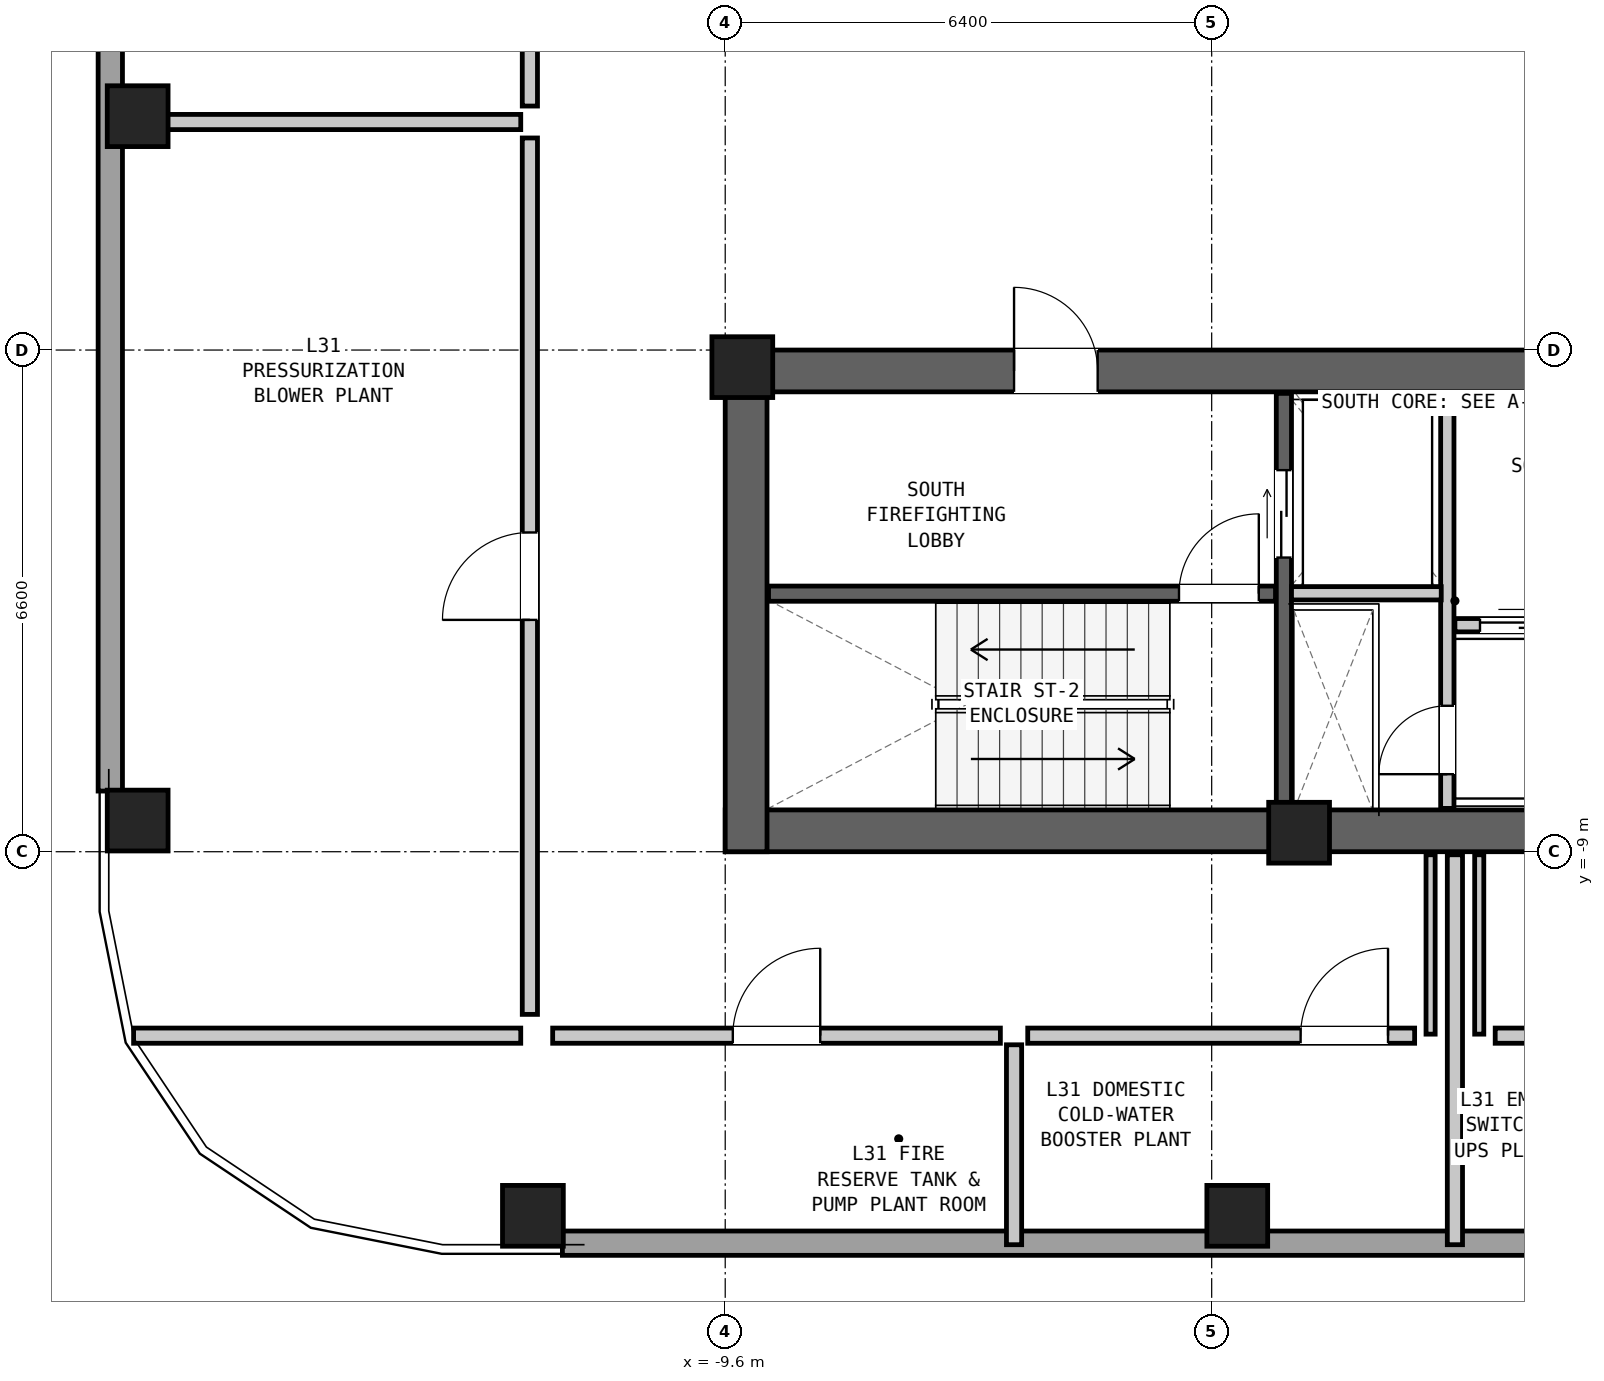
"""IFC4 building model, lengths in metres.
Left out: names, types, materials, properties, quantities, classifications, styles, units other than length and angle.
Written with IfcOpenShell. Run it as: python <this file> out.ifc"""

import sys

from ifc_helpers import new_model, si_unit, direction, frame, frame_2d, origin, origin_2d, place, context, subcontext, project, spatial, rectangle, hollow_rectangle, extrude, element, fill, save


model = new_model("IFC4")
c1 = context("Model", 3, precision=1e-05, world=origin(), true_north=direction((0.0, 1.0)))
c2 = subcontext(c1, "Body", "Model", "MODEL_VIEW")
j1 = project(units=[si_unit("LENGTHUNIT", "METRE"), si_unit("PLANEANGLEUNIT", "RADIAN")], contexts=[c1])
p1 = place(None, origin())
s1 = spatial("IfcSite", under=j1, at=p1, CompositionType="ELEMENT")
p2 = place(p1, origin())
s2 = spatial("IfcBuilding", under=s1, at=p2, CompositionType="ELEMENT")
p3 = place(p2, frame((0.0, 0.0, 108.45)))
s3 = spatial("IfcBuildingStorey", under=s2, at=p3, CompositionType="ELEMENT", Elevation=108.45)
p4 = place(p3, frame((-9.6, -8.725, 0.0), z_axis=(0.0, 0.0, 1.0), x_axis=(1.0, 0.0, 0.0)))
e1 = element("IfcWall", 1, at=p4, inside=s3, PredefinedType="SHEAR", context=c2, shape_type="SweptSolid", body=[
    extrude(rectangle(XDim=19.2, YDim=0.55, at=frame_2d((9.6, 0.0))), origin(), (0.0, 0.0, 1.0), 4.35),
])
p5 = place(p3, frame((-9.6, -2.675, 0.0), z_axis=(0.0, 0.0, 1.0), x_axis=(1.0, 0.0, 0.0)))
e2 = element("IfcWall", 2, at=p5, inside=s3, PredefinedType="SHEAR", context=c2, shape_type="SweptSolid", body=[
    extrude(rectangle(XDim=19.2, YDim=0.55, at=frame_2d((9.6, 0.0))), origin(), (0.0, 0.0, 1.0), 4.35),
])
p6 = place(p5, frame((3.8, 0.0, 0.0)))
e3 = element("IfcOpeningElement", 3, at=p6, cuts=e2, PredefinedType="OPENING", context=c2, shape_type="SweptSolid", body=[
    extrude(rectangle(XDim=1.1, YDim=2.08, at=frame_2d((0.55, 1.04))), frame((0.0, 0.287, 0.0), z_axis=(0.0, -1.0, 0.0), x_axis=(1.0, 0.0, 0.0)), (0.0, 0.0, 1.0), 0.574),
])
p7 = place(p5, frame((13.0, 0.0, 0.0)))
e4 = element("IfcOpeningElement", 4, at=p7, cuts=e2, PredefinedType="OPENING", context=c2, shape_type="SweptSolid", body=[
    extrude(rectangle(XDim=1.6, YDim=2.12, at=frame_2d((0.8, 1.06))), frame((0.0, 0.287, 0.0), z_axis=(0.0, -1.0, 0.0), x_axis=(1.0, 0.0, 0.0)), (0.0, 0.0, 1.0), 0.574),
])
p8 = place(p3, frame((-9.325, -9.0, 0.0), z_axis=(0.0, 0.0, 1.0), x_axis=(0.0, 1.0, 0.0)))
e5 = element("IfcWall", 5, at=p8, inside=s3, PredefinedType="SHEAR", context=c2, shape_type="SweptSolid", body=[
    extrude(rectangle(XDim=6.6, YDim=0.55, at=frame_2d((3.3, 0.0))), origin(), (0.0, 0.0, 1.0), 4.35),
])
for number, where, z_axis, x_axis in (
    (6, (-12.13, -13.79, 0.0), (0.0, 0.0, 1.0), (1.0, 0.0, 0.0)),
    (7, (-2.863, -13.79, 0.0), (0.0, 0.0, 1.0), (1.0, 0.0, 0.0)),
    (8, (-17.33, 0.677, 0.0), (0.0, 0.0, 1.0), (0.0, 1.0, 0.0)),
    (9, (-17.33, -8.59, 0.0), (0.0, 0.0, 1.0), (0.0, 1.0, 0.0)),
):
    element("IfcColumn", number, at=place(p3, frame(where, z_axis=z_axis, x_axis=x_axis)), inside=s3, PredefinedType="COLUMN", context=c2, shape_type="SweptSolid", body=[
        extrude(hollow_rectangle(XDim=0.8, YDim=0.8, WallThickness=0.05, at=origin_2d()), origin(), (0.0, 0.0, 1.0), 4.35),
    ])
for number, where, z_axis, x_axis in (
    (10, (-9.375, -2.625, 0.0), (0.0, 0.0, 1.0), (1.0, 0.0, 0.0)),
    (11, (-2.05, -8.75, 0.0), (0.0, 0.0, 1.0), (1.0, 0.0, 0.0)),
):
    element("IfcColumn", number, at=place(p3, frame(where, z_axis=z_axis, x_axis=x_axis)), inside=s3, PredefinedType="COLUMN", context=c2, shape_type="SweptSolid", body=[
        extrude(rectangle(XDim=0.8, YDim=0.8, at=origin_2d()), origin(), (0.0, 0.0, 1.0), 4.35),
    ])
for number, where, z_axis, x_axis in (
    (12, (15.282, -14.15, 0.0), (0.0, 0.0, 1.0), (-1.0, 0.0, 0.0)),
    (13, (-17.69, -8.202, 0.0), (0.0, 0.0, 1.0), (0.0, 1.0, 0.0)),
):
    element("IfcWall", number, at=place(p3, frame(where, z_axis=z_axis, x_axis=x_axis)), inside=s3, PredefinedType="SOLIDWALL", context=c2, shape_type="SweptSolid", body=[
        extrude(rectangle(XDim=27.024, YDim=0.32, at=frame_2d((13.512, 0.0))), origin(), (0.0, 0.0, 1.0), 2.31),
    ])
p9 = place(p3, frame((-9.03, -5.605, 0.0), z_axis=(0.0, 0.0, 1.0), x_axis=(1.0, 0.0, 0.0)))
e14 = element("IfcWall", 14, at=p9, inside=s3, PredefinedType="SHEAR", context=c2, shape_type="SweptSolid", body=[
    extrude(rectangle(XDim=6.67, YDim=0.2, at=frame_2d((3.335, 0.0))), origin(), (0.0, 0.0, 1.0), 4.13),
])
p10 = place(p9, frame((5.4, 0.0, 0.0)))
e15 = element("IfcOpeningElement", 15, at=p10, cuts=e14, PredefinedType="OPENING", context=c2, shape_type="SweptSolid", body=[
    extrude(rectangle(XDim=1.05, YDim=2.08, at=frame_2d((0.525, 1.04))), frame((0.0, 0.112, 0.0), z_axis=(0.0, -1.0, 0.0), x_axis=(1.0, 0.0, 0.0)), (0.0, 0.0, 1.0), 0.224),
])
p11 = place(p3, frame((-2.25, -8.43, 0.0), z_axis=(0.0, 0.0, 1.0), x_axis=(0.0, 1.0, 0.0)))
e16 = element("IfcWall", 16, at=p11, inside=s3, PredefinedType="SHEAR", context=c2, shape_type="SweptSolid", body=[
    extrude(rectangle(XDim=5.46, YDim=0.2, at=frame_2d((2.73, 0.0))), origin(), (0.0, 0.0, 1.0), 4.13),
])
p12 = place(p11, frame((3.3, 0.0, 0.0)))
e17 = element("IfcOpeningElement", 17, at=p12, cuts=e16, PredefinedType="OPENING", context=c2, shape_type="SweptSolid", body=[
    extrude(rectangle(XDim=1.15, YDim=2.08, at=frame_2d((0.575, 1.04))), frame((0.0, 0.112, 0.0), z_axis=(0.0, -1.0, 0.0), x_axis=(1.0, 0.0, 0.0)), (0.0, 0.0, 1.0), 0.224),
])
p13 = place(p3, frame((-0.1, -8.43, 0.0), z_axis=(0.0, 0.0, 1.0), x_axis=(0.0, 1.0, 0.0)))
e18 = element("IfcWall", 18, at=p13, inside=s3, PredefinedType="PARTITIONING", context=c2, shape_type="SweptSolid", body=[
    extrude(rectangle(XDim=5.46, YDim=0.175, at=frame_2d((2.73, 0.0))), origin(), (0.0, 0.0, 1.0), 4.13),
])
p14 = place(p13, frame((0.45, 0.0, 0.0)))
e19 = element("IfcOpeningElement", 19, at=p14, cuts=e18, PredefinedType="OPENING", context=c2, shape_type="SweptSolid", body=[
    extrude(rectangle(XDim=0.9, YDim=2.05, at=frame_2d((0.45, 1.025))), frame((0.0, 0.1, 0.0), z_axis=(0.0, -1.0, 0.0), x_axis=(1.0, 0.0, 0.0)), (0.0, 0.0, 1.0), 0.199),
])
p15 = place(p3, frame((-2.15, -5.6, 0.0), z_axis=(0.0, 0.0, 1.0), x_axis=(1.0, 0.0, 0.0)))
e20 = element("IfcWall", 20, at=p15, inside=s3, PredefinedType="PARTITIONING", context=c2, shape_type="SweptSolid", body=[
    extrude(rectangle(XDim=1.97, YDim=0.175, at=frame_2d((0.985, 0.0))), origin(), (0.0, 0.0, 1.0), 4.13),
])
p16 = place(p3, frame((0.0, -6.02, 0.0), z_axis=(0.0, 0.0, 1.0), x_axis=(1.0, 0.0, 0.0)))
e21 = element("IfcWall", 21, at=p16, inside=s3, PredefinedType="PARTITIONING", context=c2, shape_type="SweptSolid", body=[
    extrude(rectangle(XDim=9.03, YDim=0.175, at=frame_2d((4.515, 0.0))), origin(), (0.0, 0.0, 1.0), 4.13),
])
p17 = place(p16, frame((0.33, 0.0, 0.0)))
e22 = element("IfcOpeningElement", 22, at=p17, cuts=e21, PredefinedType="OPENING", context=c2, shape_type="SweptSolid", body=[
    extrude(rectangle(XDim=1.1, YDim=2.06, at=frame_2d((0.55, 1.03))), frame((0.0, 0.1, 0.0), z_axis=(0.0, -1.0, 0.0), x_axis=(1.0, 0.0, 0.0)), (0.0, 0.0, 1.0), 0.199),
])
p18 = place(p16, frame((2.3, 0.0, 0.0)))
e23 = element("IfcOpeningElement", 23, at=p18, cuts=e21, PredefinedType="OPENING", context=c2, shape_type="SweptSolid", body=[
    extrude(rectangle(XDim=1.1, YDim=2.06, at=frame_2d((0.55, 1.03))), frame((0.0, 0.1, 0.0), z_axis=(0.0, -1.0, 0.0), x_axis=(1.0, 0.0, 0.0)), (0.0, 0.0, 1.0), 0.199),
])
p19 = place(p16, frame((4.22, 0.0, 0.0)))
e24 = element("IfcOpeningElement", 24, at=p19, cuts=e21, PredefinedType="OPENING", context=c2, shape_type="SweptSolid", body=[
    extrude(rectangle(XDim=1.1, YDim=2.06, at=frame_2d((0.55, 1.03))), frame((0.0, 0.1, 0.0), z_axis=(0.0, -1.0, 0.0), x_axis=(1.0, 0.0, 0.0)), (0.0, 0.0, 1.0), 0.199),
])
p20 = place(p16, frame((5.94, 0.0, 0.0)))
e25 = element("IfcOpeningElement", 25, at=p20, cuts=e21, PredefinedType="OPENING", context=c2, shape_type="SweptSolid", body=[
    extrude(rectangle(XDim=1.1, YDim=2.06, at=frame_2d((0.55, 1.03))), frame((0.0, 0.1, 0.0), z_axis=(0.0, -1.0, 0.0), x_axis=(1.0, 0.0, 0.0)), (0.0, 0.0, 1.0), 0.199),
])
p21 = place(p16, frame((7.66, 0.0, 0.0)))
e26 = element("IfcOpeningElement", 26, at=p21, cuts=e21, PredefinedType="OPENING", context=c2, shape_type="SweptSolid", body=[
    extrude(rectangle(XDim=1.1, YDim=2.06, at=frame_2d((0.55, 1.03))), frame((0.0, 0.1, 0.0), z_axis=(0.0, -1.0, 0.0), x_axis=(1.0, 0.0, 0.0)), (0.0, 0.0, 1.0), 0.199),
])
p22 = place(p3, frame((0.0, -14.17, 0.0), z_axis=(0.0, 0.0, 1.0), x_axis=(0.0, 1.0, 0.0)))
e27 = element("IfcWall", 27, at=p22, inside=s3, PredefinedType="PARTITIONING", context=c2, shape_type="SweptSolid", body=[
    extrude(rectangle(XDim=5.13, YDim=0.2, at=frame_2d((2.565, 0.0))), origin(), (0.0, 0.0, 1.0), 2.31),
])
for number, where, z_axis, x_axis in (
    (28, (-0.32, -11.4, 0.0), (0.0, 0.0, 1.0), (0.0, 1.0, 0.0)),
    (29, (0.32, -11.4, 0.0), (0.0, 0.0, 1.0), (0.0, 1.0, 0.0)),
):
    element("IfcWall", number, at=place(p3, frame(where, z_axis=z_axis, x_axis=x_axis)), inside=s3, PredefinedType="PARTITIONING", context=c2, shape_type="SweptSolid", body=[
        extrude(rectangle(XDim=2.36, YDim=0.12, at=frame_2d((1.18, 0.0))), origin(), (0.0, 0.0, 1.0), 2.31),
    ])
p23 = place(p3, frame((-11.87, -11.42, 0.0), z_axis=(0.0, 0.0, 1.0), x_axis=(1.0, 0.0, 0.0)))
e30 = element("IfcWall", 30, at=p23, inside=s3, PredefinedType="PARTITIONING", context=c2, shape_type="SweptSolid", body=[
    extrude(rectangle(XDim=5.89, YDim=0.2, at=frame_2d((2.945, 0.0))), origin(), (0.0, 0.0, 1.0), 3.647),
])
p24 = place(p23, frame((2.37, 0.0, 0.0)))
e31 = element("IfcOpeningElement", 31, at=p24, cuts=e30, PredefinedType="OPENING", context=c2, shape_type="SweptSolid", body=[
    extrude(rectangle(XDim=1.15, YDim=2.1, at=frame_2d((0.575, 1.05))), frame((0.0, 0.112, 0.0), z_axis=(0.0, -1.0, 0.0), x_axis=(1.0, 0.0, 0.0)), (0.0, 0.0, 1.0), 0.224),
])
p25 = place(p3, frame((-5.8, -14.17, 0.0), z_axis=(0.0, 0.0, 1.0), x_axis=(0.0, 1.0, 0.0)))
e32 = element("IfcWall", 32, at=p25, inside=s3, PredefinedType="PARTITIONING", context=c2, shape_type="SweptSolid", body=[
    extrude(rectangle(XDim=2.63, YDim=0.2, at=frame_2d((1.315, 0.0))), origin(), (0.0, 0.0, 1.0), 3.647),
])
p26 = place(p3, frame((-5.62, -11.42, 0.0), z_axis=(0.0, 0.0, 1.0), x_axis=(1.0, 0.0, 0.0)))
e33 = element("IfcWall", 33, at=p26, inside=s3, PredefinedType="PARTITIONING", context=c2, shape_type="SweptSolid", body=[
    extrude(rectangle(XDim=5.09, YDim=0.2, at=frame_2d((2.545, 0.0))), origin(), (0.0, 0.0, 1.0), 4.13),
])
p27 = place(p26, frame((3.59, 0.0, 0.0)))
e34 = element("IfcOpeningElement", 34, at=p27, cuts=e33, PredefinedType="OPENING", context=c2, shape_type="SweptSolid", body=[
    extrude(rectangle(XDim=1.15, YDim=2.1, at=frame_2d((0.575, 1.05))), frame((0.0, 0.112, 0.0), z_axis=(0.0, -1.0, 0.0), x_axis=(1.0, 0.0, 0.0)), (0.0, 0.0, 1.0), 0.224),
])
p28 = place(p3, frame((0.53, -11.42, 0.0), z_axis=(0.0, 0.0, 1.0), x_axis=(1.0, 0.0, 0.0)))
e35 = element("IfcWall", 35, at=p28, inside=s3, PredefinedType="PARTITIONING", context=c2, shape_type="SweptSolid", body=[
    extrude(rectangle(XDim=5.09, YDim=0.2, at=frame_2d((2.545, 0.0))), origin(), (0.0, 0.0, 1.0), 4.13),
])
p29 = place(p28, frame((1.97, 0.0, 0.0)))
e36 = element("IfcOpeningElement", 36, at=p29, cuts=e35, PredefinedType="OPENING", context=c2, shape_type="SweptSolid", body=[
    extrude(rectangle(XDim=1.15, YDim=2.1, at=frame_2d((0.575, 1.05))), frame((0.0, 0.112, 0.0), z_axis=(0.0, -1.0, 0.0), x_axis=(1.0, 0.0, 0.0)), (0.0, 0.0, 1.0), 0.224),
])
p30 = place(p3, frame((-17.384, -11.42, 0.0), z_axis=(0.0, 0.0, 1.0), x_axis=(1.0, 0.0, 0.0)))
e37 = element("IfcWall", 37, at=p30, inside=s3, PredefinedType="PARTITIONING", context=c2, shape_type="SweptSolid", body=[
    extrude(rectangle(XDim=5.094, YDim=0.2, at=frame_2d((2.547, 0.0))), origin(), (0.0, 0.0, 1.0), 3.647),
])
p31 = place(p3, frame((-17.71, 0.6, 0.0), z_axis=(0.0, 0.0, 1.0), x_axis=(1.0, 0.0, 0.0)))
e38 = element("IfcWall", 38, at=p31, inside=s3, PredefinedType="PARTITIONING", context=c2, shape_type="SweptSolid", body=[
    extrude(rectangle(XDim=5.42, YDim=0.2, at=frame_2d((2.71, 0.0))), origin(), (0.0, 0.0, 1.0), 2.31),
])
p32 = place(p3, frame((-12.17, -11.14, 0.0), z_axis=(0.0, 0.0, 1.0), x_axis=(0.0, 1.0, 0.0)))
e39 = element("IfcWall", 39, at=p32, inside=s3, PredefinedType="PARTITIONING", context=c2, shape_type="SweptSolid", body=[
    extrude(rectangle(XDim=11.53, YDim=0.2, at=frame_2d((5.765, 0.0))), origin(), (0.0, 0.0, 1.0), 2.31),
])
p33 = place(p32, frame((5.19, 0.0, 0.0)))
e40 = element("IfcOpeningElement", 40, at=p33, cuts=e39, PredefinedType="OPENING", context=c2, shape_type="SweptSolid", body=[
    extrude(rectangle(XDim=1.15, YDim=2.1, at=frame_2d((0.575, 1.05))), frame((0.0, 0.112, 0.0), z_axis=(0.0, -1.0, 0.0), x_axis=(1.0, 0.0, 0.0)), (0.0, 0.0, 1.0), 0.224),
])
p34 = place(p3, frame((-12.17, 0.81, 0.0), z_axis=(0.0, 0.0, 1.0), x_axis=(0.0, 1.0, 0.0)))
e41 = element("IfcWall", 41, at=p34, inside=s3, PredefinedType="PARTITIONING", context=c2, shape_type="SweptSolid", body=[
    extrude(rectangle(XDim=11.53, YDim=0.2, at=frame_2d((5.765, 0.0))), origin(), (0.0, 0.0, 1.0), 4.13),
])
p35 = place(p34, frame((5.19, 0.0, 0.0)))
e42 = element("IfcOpeningElement", 42, at=p35, cuts=e41, PredefinedType="OPENING", context=c2, shape_type="SweptSolid", body=[
    extrude(rectangle(XDim=1.15, YDim=2.1, at=frame_2d((0.575, 1.05))), frame((0.0, 0.112, 0.0), z_axis=(0.0, -1.0, 0.0), x_axis=(1.0, 0.0, 0.0)), (0.0, 0.0, 1.0), 0.224),
])
p36 = place(p10, origin())
e43 = element("IfcDoor", 43, at=p36, inside=s3, OperationType="SINGLE_SWING_RIGHT", PredefinedType="DOOR", context=c2, shape_type="SweptSolid", body=[
    extrude(rectangle(XDim=1.05, YDim=2.08, at=frame_2d((0.525, 1.04))), frame((0.0, 0.025, 0.0), z_axis=(0.0, -1.0, 0.0), x_axis=(1.0, 0.0, 0.0)), (0.0, 0.0, 1.0), 0.05),
])
fill(e15, e43)
p37 = place(p6, origin())
e44 = element("IfcDoor", 44, at=p37, inside=s3, OperationType="SINGLE_SWING_LEFT", PredefinedType="DOOR", context=c2, shape_type="SweptSolid", body=[
    extrude(rectangle(XDim=1.1, YDim=2.08, at=frame_2d((0.55, 1.04))), frame((0.0, 0.025, 0.0), z_axis=(0.0, -1.0, 0.0), x_axis=(1.0, 0.0, 0.0)), (0.0, 0.0, 1.0), 0.05),
])
fill(e3, e44)
p38 = place(p12, origin())
e45 = element("IfcDoor", 45, at=p38, inside=s3, OperationType="DOUBLE_DOOR_SLIDING", PredefinedType="DOOR", context=c2, shape_type="SweptSolid", body=[
    extrude(rectangle(XDim=1.15, YDim=2.08, at=frame_2d((0.575, 1.04))), frame((0.0, 0.025, 0.0), z_axis=(0.0, -1.0, 0.0), x_axis=(1.0, 0.0, 0.0)), (0.0, 0.0, 1.0), 0.05),
])
fill(e17, e45)
p39 = place(p14, origin())
e46 = element("IfcDoor", 46, at=p39, inside=s3, OperationType="SINGLE_SWING_LEFT", PredefinedType="DOOR", context=c2, shape_type="SweptSolid", body=[
    extrude(rectangle(XDim=0.9, YDim=2.05, at=frame_2d((0.45, 1.025))), frame((0.0, 0.025, 0.0), z_axis=(0.0, -1.0, 0.0), x_axis=(1.0, 0.0, 0.0)), (0.0, 0.0, 1.0), 0.05),
])
fill(e19, e46)
p40 = place(p17, origin())
e47 = element("IfcDoor", 47, at=p40, inside=s3, OperationType="DOUBLE_DOOR_SLIDING", PredefinedType="DOOR", context=c2, shape_type="SweptSolid", body=[
    extrude(rectangle(XDim=1.1, YDim=2.06, at=frame_2d((0.55, 1.03))), frame((0.0, 0.025, 0.0), z_axis=(0.0, -1.0, 0.0), x_axis=(1.0, 0.0, 0.0)), (0.0, 0.0, 1.0), 0.05),
])
fill(e22, e47)
p41 = place(p24, origin())
e48 = element("IfcDoor", 48, at=p41, inside=s3, OperationType="SINGLE_SWING_RIGHT", PredefinedType="DOOR", context=c2, shape_type="SweptSolid", body=[
    extrude(rectangle(XDim=1.15, YDim=2.1, at=frame_2d((0.575, 1.05))), frame((0.0, 0.025, 0.0), z_axis=(0.0, -1.0, 0.0), x_axis=(1.0, 0.0, 0.0)), (0.0, 0.0, 1.0), 0.05),
])
fill(e31, e48)
p42 = place(p27, origin())
e49 = element("IfcDoor", 49, at=p42, inside=s3, OperationType="SINGLE_SWING_RIGHT", PredefinedType="DOOR", context=c2, shape_type="SweptSolid", body=[
    extrude(rectangle(XDim=1.15, YDim=2.1, at=frame_2d((0.575, 1.05))), frame((0.0, 0.025, 0.0), z_axis=(0.0, -1.0, 0.0), x_axis=(1.0, 0.0, 0.0)), (0.0, 0.0, 1.0), 0.05),
])
fill(e34, e49)
p43 = place(p33, origin())
e50 = element("IfcDoor", 50, at=p43, inside=s3, OperationType="SINGLE_SWING_LEFT", PredefinedType="DOOR", context=c2, shape_type="SweptSolid", body=[
    extrude(rectangle(XDim=1.15, YDim=2.1, at=frame_2d((0.575, 1.05))), frame((0.0, 0.025, 0.0), z_axis=(0.0, -1.0, 0.0), x_axis=(1.0, 0.0, 0.0)), (0.0, 0.0, 1.0), 0.05),
])
fill(e40, e50)
save(model, sys.argv[1])
